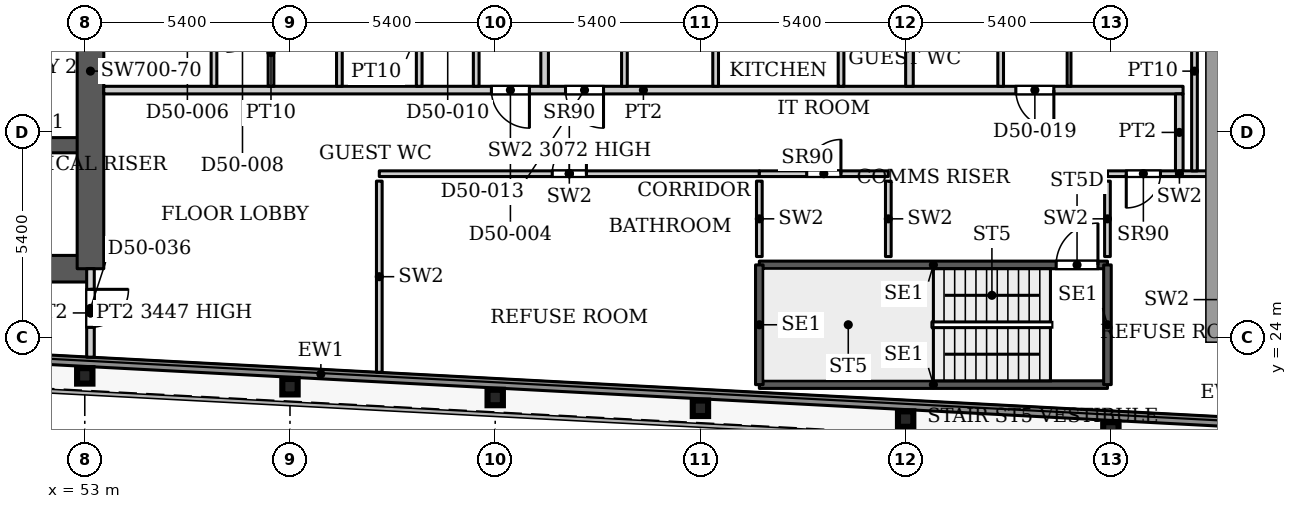
"""IFC4 building model, lengths in metres.
Left out: names, types, materials, properties, quantities, classifications, styles, units other than length and angle.
Written with IfcOpenShell. Run it as: python <this file> out.ifc"""

import sys

from ifc_helpers import new_model, si_unit, direction, frame, frame_2d, origin, origin_2d, place, context, subcontext, project, spatial, rectangle, i_section, extrude, source, transform, mapped, element, fill, save


model = new_model("IFC4")
c1 = context("Model", 3, precision=1e-05, world=origin(), true_north=direction((0.0, 1.0)))
c2 = subcontext(c1, "Body", "Model", "MODEL_VIEW")
j1 = project(units=[si_unit("LENGTHUNIT", "METRE"), si_unit("PLANEANGLEUNIT", "RADIAN")], contexts=[c1])
p1 = place(None, origin())
s1 = spatial("IfcSite", under=j1, at=p1, CompositionType="ELEMENT")
p2 = place(p1, origin())
s2 = spatial("IfcBuilding", under=s1, at=p2, CompositionType="ELEMENT")
p3 = place(p2, frame((0.0, 0.0, 220.1)))
s3 = spatial("IfcBuildingStorey", under=s2, at=p3, CompositionType="ELEMENT", Elevation=220.1)
for number, where, z_axis, x_axis in (
    (1, (80.0, 21.558, 0.0), (0.0, 0.0, 1.0), (1.0, 0.0, 0.0)),
    (2, (74.6, 21.843, 0.0), (0.0, 0.0, 1.0), (1.0, 0.0, 0.0)),
    (3, (69.2, 22.127, 0.0), (0.0, 0.0, 1.0), (1.0, 0.0, 0.0)),
    (4, (63.8, 22.411, 0.0), (0.0, 0.0, 1.0), (1.0, 0.0, 0.0)),
    (5, (58.4, 22.695, 0.0), (0.0, 0.0, 1.0), (1.0, 0.0, 0.0)),
    (6, (53.0, 22.98, 0.0), (0.0, 0.0, 1.0), (1.0, 0.0, 0.0)),
):
    element("IfcColumn", number, at=place(p3, frame(where, z_axis=z_axis, x_axis=x_axis)), inside=s3, PredefinedType="COLUMN", context=c2, shape_type="SweptSolid", body=[
        extrude(i_section(OverallWidth=0.404, OverallDepth=0.407, WebThickness=0.027, FlangeThickness=0.044, FilletRadius=0.012, at=origin_2d()), origin(), (0.0, 0.0, 1.0), 3.9),
    ])
p4 = place(p3, frame((34.75, 25.8, 0.0), z_axis=(0.0, 0.0, 1.0), x_axis=(1.0, 0.0, 0.0)))
e7 = element("IfcWall", 7, at=p4, inside=s3, PredefinedType="SHEAR", context=c2, shape_type="SweptSolid", body=[
    extrude(rectangle(XDim=18.4, YDim=0.7, at=frame_2d((9.2, 0.0))), origin(), (0.0, 0.0, 1.0), 3.9),
])
p5 = place(p3, frame((34.75, 29.05, 0.0), z_axis=(0.0, 0.0, 1.0), x_axis=(1.0, 0.0, 0.0)))
e8 = element("IfcWall", 8, at=p5, inside=s3, PredefinedType="SHEAR", context=c2, shape_type="SweptSolid", body=[
    extrude(rectangle(XDim=18.4, YDim=0.4, at=frame_2d((9.2, 0.0))), origin(), (0.0, 0.0, 1.0), 3.9),
])
p6 = place(p5, frame((0.875, 0.0, 0.0)))
e9 = element("IfcOpeningElement", 9, at=p6, cuts=e8, PredefinedType="OPENING", context=c2, shape_type="SweptSolid", body=[
    extrude(rectangle(XDim=1.1, YDim=2.2, at=frame_2d((0.55, 1.1))), frame((0.0, 0.21, 0.0), z_axis=(0.0, -1.0, 0.0), x_axis=(1.0, 0.0, 0.0)), (0.0, 0.0, 1.0), 0.42),
])
p7 = place(p5, frame((3.725, 0.0, 0.0)))
e10 = element("IfcOpeningElement", 10, at=p7, cuts=e8, PredefinedType="OPENING", context=c2, shape_type="SweptSolid", body=[
    extrude(rectangle(XDim=1.1, YDim=2.2, at=frame_2d((0.55, 1.1))), frame((0.0, 0.21, 0.0), z_axis=(0.0, -1.0, 0.0), x_axis=(1.0, 0.0, 0.0)), (0.0, 0.0, 1.0), 0.42),
])
p8 = place(p5, frame((6.575, 0.0, 0.0)))
e11 = element("IfcOpeningElement", 11, at=p8, cuts=e8, PredefinedType="OPENING", context=c2, shape_type="SweptSolid", body=[
    extrude(rectangle(XDim=1.1, YDim=2.2, at=frame_2d((0.55, 1.1))), frame((0.0, 0.21, 0.0), z_axis=(0.0, -1.0, 0.0), x_axis=(1.0, 0.0, 0.0)), (0.0, 0.0, 1.0), 0.42),
])
p9 = place(p5, frame((9.425, 0.0, 0.0)))
e12 = element("IfcOpeningElement", 12, at=p9, cuts=e8, PredefinedType="OPENING", context=c2, shape_type="SweptSolid", body=[
    extrude(rectangle(XDim=1.1, YDim=2.2, at=frame_2d((0.55, 1.1))), frame((0.0, 0.21, 0.0), z_axis=(0.0, -1.0, 0.0), x_axis=(1.0, 0.0, 0.0)), (0.0, 0.0, 1.0), 0.42),
])
p10 = place(p5, frame((12.275, 0.0, 0.0)))
e13 = element("IfcOpeningElement", 13, at=p10, cuts=e8, PredefinedType="OPENING", context=c2, shape_type="SweptSolid", body=[
    extrude(rectangle(XDim=1.1, YDim=2.2, at=frame_2d((0.55, 1.1))), frame((0.0, 0.21, 0.0), z_axis=(0.0, -1.0, 0.0), x_axis=(1.0, 0.0, 0.0)), (0.0, 0.0, 1.0), 0.42),
])
p11 = place(p5, frame((15.125, 0.0, 0.0)))
e14 = element("IfcOpeningElement", 14, at=p11, cuts=e8, PredefinedType="OPENING", context=c2, shape_type="SweptSolid", body=[
    extrude(rectangle(XDim=1.1, YDim=2.2, at=frame_2d((0.55, 1.1))), frame((0.0, 0.21, 0.0), z_axis=(0.0, -1.0, 0.0), x_axis=(1.0, 0.0, 0.0)), (0.0, 0.0, 1.0), 0.42),
])
p12 = place(p3, frame((53.15, 25.8, 0.0), z_axis=(0.0, 0.0, 1.0), x_axis=(0.0, 1.0, 0.0)))
e15 = element("IfcWall", 15, at=p12, inside=s3, PredefinedType="SHEAR", context=c2, shape_type="SweptSolid", body=[
    extrude(rectangle(XDim=10.4, YDim=0.7, at=frame_2d((5.2, 0.0))), origin(), (0.0, 0.0, 1.0), 3.9),
])
p13 = place(p3, frame((84.386, 21.703, 0.0), z_axis=(0.0, 0.0, 1.0), x_axis=(-0.998617508267, 0.05256493302, 0.0)))
e16 = element("IfcWall", 16, at=p13, inside=s3, PredefinedType="SOLIDWALL", context=c2, shape_type="SweptSolid", body=[
    extrude(rectangle(XDim=50.417, YDim=0.25, at=frame_2d((25.208, 0.0))), origin(), (0.0, 0.0, 1.0), 3.75),
])
p14 = place(p3, frame((70.75, 22.75, 0.0), z_axis=(0.0, 0.0, 1.0), x_axis=(1.0, 0.0, 0.0)))
e17 = element("IfcWall", 17, at=p14, inside=s3, PredefinedType="SHEAR", context=c2, shape_type="SweptSolid", body=[
    extrude(rectangle(XDim=9.16, YDim=0.2, at=frame_2d((4.58, 0.0))), origin(), (0.0, 0.0, 1.0), 3.9),
])
p15 = place(p3, frame((70.75, 25.9, 0.0), z_axis=(0.0, 0.0, 1.0), x_axis=(1.0, 0.0, 0.0)))
e18 = element("IfcWall", 18, at=p15, inside=s3, PredefinedType="SHEAR", context=c2, shape_type="SweptSolid", body=[
    extrude(rectangle(XDim=9.16, YDim=0.2, at=frame_2d((4.58, 0.0))), origin(), (0.0, 0.0, 1.0), 3.9),
])
p16 = place(p15, frame((7.81, 0.0, 0.0)))
e19 = element("IfcOpeningElement", 19, at=p16, cuts=e18, PredefinedType="OPENING", context=c2, shape_type="SweptSolid", body=[
    extrude(rectangle(XDim=1.1, YDim=2.2, at=frame_2d((0.55, 1.1))), frame((0.0, 0.11, 0.0), z_axis=(0.0, -1.0, 0.0), x_axis=(1.0, 0.0, 0.0)), (0.0, 0.0, 1.0), 0.22),
])
for number, where, z_axis, x_axis in (
    (20, (70.75, 22.75, 0.0), (0.0, 0.0, 1.0), (0.0, 1.0, 0.0)),
    (21, (79.91, 22.75, 0.0), (0.0, 0.0, 1.0), (0.0, 1.0, 0.0)),
):
    element("IfcWall", number, at=place(p3, frame(where, z_axis=z_axis, x_axis=x_axis)), inside=s3, PredefinedType="SHEAR", context=c2, shape_type="SweptSolid", body=[
        extrude(rectangle(XDim=3.15, YDim=0.2, at=frame_2d((1.575, 0.0))), origin(), (0.0, 0.0, 1.0), 3.9),
    ])
p17 = place(p3, frame((60.75, 28.3, 0.0), z_axis=(0.0, 0.0, 1.0), x_axis=(1.0, 0.0, 0.0)))
e22 = element("IfcWall", 22, at=p17, inside=s3, PredefinedType="PARTITIONING", context=c2, shape_type="SweptSolid", body=[
    extrude(rectangle(XDim=10.0, YDim=0.15, at=frame_2d((5.0, 0.0))), origin(), (0.0, 0.0, 1.0), 3.072),
])
p18 = place(p17, frame((4.55, 0.0, 0.0)))
e23 = element("IfcOpeningElement", 23, at=p18, cuts=e22, PredefinedType="OPENING", context=c2, shape_type="SweptSolid", body=[
    extrude(rectangle(XDim=0.9, YDim=2.2, at=frame_2d((0.45, 1.1))), frame((0.0, 0.085, 0.0), z_axis=(0.0, -1.0, 0.0), x_axis=(1.0, 0.0, 0.0)), (0.0, 0.0, 1.0), 0.17),
])
p19 = place(p3, frame((60.75, 23.075, 0.0), z_axis=(0.0, 0.0, 1.0), x_axis=(0.0, 1.0, 0.0)))
e24 = element("IfcWall", 24, at=p19, inside=s3, PredefinedType="PARTITIONING", context=c2, shape_type="SweptSolid", body=[
    extrude(rectangle(XDim=5.03, YDim=0.15, at=frame_2d((2.515, 0.0))), origin(), (0.0, 0.0, 1.0), 3.9),
])
p20 = place(p3, frame((70.75, 26.12, 0.0), z_axis=(0.0, 0.0, 1.0), x_axis=(0.0, 1.0, 0.0)))
e25 = element("IfcWall", 25, at=p20, inside=s3, PredefinedType="PARTITIONING", context=c2, shape_type="SweptSolid", body=[
    extrude(rectangle(XDim=1.985, YDim=0.15, at=frame_2d((0.992, 0.0))), origin(), (0.0, 0.0, 1.0), 3.9),
])
p21 = place(p3, frame((70.75, 28.3, 0.0), z_axis=(0.0, 0.0, 1.0), x_axis=(1.0, 0.0, 0.0)))
e26 = element("IfcWall", 26, at=p21, inside=s3, PredefinedType="PARTITIONING", context=c2, shape_type="SweptSolid", body=[
    extrude(rectangle(XDim=3.394, YDim=0.15, at=frame_2d((1.697, 0.0))), origin(), (0.0, 0.0, 1.0), 3.9),
])
p22 = place(p21, frame((1.247, 0.0, 0.0)))
e27 = element("IfcOpeningElement", 27, at=p22, cuts=e26, PredefinedType="OPENING", context=c2, shape_type="SweptSolid", body=[
    extrude(rectangle(XDim=0.9, YDim=2.2, at=frame_2d((0.45, 1.1))), frame((0.0, 0.085, 0.0), z_axis=(0.0, -1.0, 0.0), x_axis=(1.0, 0.0, 0.0)), (0.0, 0.0, 1.0), 0.17),
])
p23 = place(p3, frame((74.144, 26.12, 0.0), z_axis=(0.0, 0.0, 1.0), x_axis=(0.0, 1.0, 0.0)))
e28 = element("IfcWall", 28, at=p23, inside=s3, PredefinedType="PARTITIONING", context=c2, shape_type="SweptSolid", body=[
    extrude(rectangle(XDim=1.985, YDim=0.15, at=frame_2d((0.992, 0.0))), origin(), (0.0, 0.0, 1.0), 3.9),
])
p24 = place(p3, frame((79.91, 28.3, 0.0), z_axis=(0.0, 0.0, 1.0), x_axis=(1.0, 0.0, 0.0)))
e29 = element("IfcWall", 29, at=p24, inside=s3, PredefinedType="PARTITIONING", context=c2, shape_type="SweptSolid", body=[
    extrude(rectangle(XDim=3.788, YDim=0.15, at=frame_2d((1.894, 0.0))), origin(), (0.0, 0.0, 1.0), 3.9),
])
p25 = place(p24, frame((0.495, 0.0, 0.0)))
e30 = element("IfcOpeningElement", 30, at=p25, cuts=e29, PredefinedType="OPENING", context=c2, shape_type="SweptSolid", body=[
    extrude(rectangle(XDim=0.9, YDim=2.2, at=frame_2d((0.45, 1.1))), frame((0.0, 0.085, 0.0), z_axis=(0.0, -1.0, 0.0), x_axis=(1.0, 0.0, 0.0)), (0.0, 0.0, 1.0), 0.17),
])
p26 = place(p3, frame((79.91, 26.12, 0.0), z_axis=(0.0, 0.0, 1.0), x_axis=(0.0, 1.0, 0.0)))
e31 = element("IfcWall", 31, at=p26, inside=s3, PredefinedType="PARTITIONING", context=c2, shape_type="SweptSolid", body=[
    extrude(rectangle(XDim=1.985, YDim=0.15, at=frame_2d((0.992, 0.0))), origin(), (0.0, 0.0, 1.0), 3.9),
])
p27 = place(p3, frame((53.15, 23.472, 0.0), z_axis=(0.0, 0.0, 1.0), x_axis=(0.0, 1.0, 0.0)))
e32 = element("IfcWall", 32, at=p27, inside=s3, PredefinedType="PARTITIONING", context=c2, shape_type="SweptSolid", body=[
    extrude(rectangle(XDim=2.328, YDim=0.2, at=frame_2d((1.164, 0.0))), origin(), (0.0, 0.0, 1.0), 3.447),
])
p28 = place(p27, frame((0.785, 0.0, 0.0)))
e33 = element("IfcOpeningElement", 33, at=p28, cuts=e32, PredefinedType="OPENING", context=c2, shape_type="SweptSolid", body=[
    extrude(rectangle(XDim=1.0, YDim=2.1, at=frame_2d((0.5, 1.05))), frame((0.0, 0.11, 0.0), z_axis=(0.0, -1.0, 0.0), x_axis=(1.0, 0.0, 0.0)), (0.0, 0.0, 1.0), 0.22),
])
p29 = place(p3, frame((53.499, 30.5, 0.0), z_axis=(0.0, 0.0, 1.0), x_axis=(1.0, 0.0, 0.0)))
e34 = element("IfcWall", 34, at=p29, inside=s3, PredefinedType="PARTITIONING", context=c2, shape_type="SweptSolid", body=[
    extrude(rectangle(XDim=28.401, YDim=0.2, at=frame_2d((14.2, 0.0))), origin(), (0.0, 0.0, 1.0), 3.6),
])
p30 = place(p29, frame((10.201, 0.0, 0.0)))
e35 = element("IfcOpeningElement", 35, at=p30, cuts=e34, PredefinedType="OPENING", context=c2, shape_type="SweptSolid", body=[
    extrude(rectangle(XDim=1.0, YDim=2.1, at=frame_2d((0.5, 1.05))), frame((0.0, 0.11, 0.0), z_axis=(0.0, -1.0, 0.0), x_axis=(1.0, 0.0, 0.0)), (0.0, 0.0, 1.0), 0.22),
])
p31 = place(p29, frame((12.151, 0.0, 0.0)))
e36 = element("IfcOpeningElement", 36, at=p31, cuts=e34, PredefinedType="OPENING", context=c2, shape_type="SweptSolid", body=[
    extrude(rectangle(XDim=1.0, YDim=2.1, at=frame_2d((0.5, 1.05))), frame((0.0, 0.11, 0.0), z_axis=(0.0, -1.0, 0.0), x_axis=(1.0, 0.0, 0.0)), (0.0, 0.0, 1.0), 0.22),
])
p32 = place(p29, frame((24.001, 0.0, 0.0)))
e37 = element("IfcOpeningElement", 37, at=p32, cuts=e34, PredefinedType="OPENING", context=c2, shape_type="SweptSolid", body=[
    extrude(rectangle(XDim=1.0, YDim=2.1, at=frame_2d((0.5, 1.05))), frame((0.0, 0.11, 0.0), z_axis=(0.0, -1.0, 0.0), x_axis=(1.0, 0.0, 0.0)), (0.0, 0.0, 1.0), 0.22),
])
p33 = place(p3, frame((56.4, 30.6, 0.0), z_axis=(0.0, 0.0, 1.0), x_axis=(0.0, 1.0, 0.0)))
e38 = element("IfcWall", 38, at=p33, inside=s3, PredefinedType="PARTITIONING", context=c2, shape_type="SweptSolid", body=[
    extrude(rectangle(XDim=3.025, YDim=0.15, at=frame_2d((1.512, 0.0))), origin(), (0.0, 0.0, 1.0), 3.6),
])
p34 = place(p3, frame((57.9, 30.6, 0.0), z_axis=(0.0, 0.0, 1.0), x_axis=(0.0, 1.0, 0.0)))
e39 = element("IfcWall", 39, at=p34, inside=s3, PredefinedType="PARTITIONING", context=c2, shape_type="SweptSolid", body=[
    extrude(rectangle(XDim=1.775, YDim=0.15, at=frame_2d((0.887, 0.0))), origin(), (0.0, 0.0, 1.0), 3.6),
])
for number, where, z_axis, x_axis in (
    (40, (59.7, 30.6, 0.0), (0.0, 0.0, 1.0), (0.0, 1.0, 0.0)),
    (41, (61.8, 30.6, 0.0), (0.0, 0.0, 1.0), (0.0, 1.0, 0.0)),
    (42, (63.3, 30.6, 0.0), (0.0, 0.0, 1.0), (0.0, 1.0, 0.0)),
):
    element("IfcWall", number, at=place(p3, frame(where, z_axis=z_axis, x_axis=x_axis)), inside=s3, PredefinedType="PARTITIONING", context=c2, shape_type="SweptSolid", body=[
        extrude(rectangle(XDim=3.025, YDim=0.15, at=frame_2d((1.512, 0.0))), origin(), (0.0, 0.0, 1.0), 3.6),
    ])
p35 = place(p3, frame((65.1, 30.6, 0.0), z_axis=(0.0, 0.0, 1.0), x_axis=(0.0, 1.0, 0.0)))
e43 = element("IfcWall", 43, at=p35, inside=s3, PredefinedType="PARTITIONING", context=c2, shape_type="SweptSolid", body=[
    extrude(rectangle(XDim=13.3, YDim=0.2, at=frame_2d((6.65, 0.0))), origin(), (0.0, 0.0, 1.0), 3.6),
])
for number, where, z_axis, x_axis in (
    (44, (67.2, 30.6, 0.0), (0.0, 0.0, 1.0), (0.0, 1.0, 0.0)),
    (45, (69.6, 30.6, 0.0), (0.0, 0.0, 1.0), (0.0, 1.0, 0.0)),
    (46, (72.9, 30.6, 0.0), (0.0, 0.0, 1.0), (0.0, 1.0, 0.0)),
):
    element("IfcWall", number, at=place(p3, frame(where, z_axis=z_axis, x_axis=x_axis)), inside=s3, PredefinedType="PARTITIONING", context=c2, shape_type="SweptSolid", body=[
        extrude(rectangle(XDim=3.025, YDim=0.15, at=frame_2d((1.512, 0.0))), origin(), (0.0, 0.0, 1.0), 3.6),
    ])
p36 = place(p3, frame((74.7, 30.6, 0.0), z_axis=(0.0, 0.0, 1.0), x_axis=(0.0, 1.0, 0.0)))
e47 = element("IfcWall", 47, at=p36, inside=s3, PredefinedType="PARTITIONING", context=c2, shape_type="SweptSolid", body=[
    extrude(rectangle(XDim=13.3, YDim=0.2, at=frame_2d((6.65, 0.0))), origin(), (0.0, 0.0, 1.0), 3.6),
])
p37 = place(p3, frame((77.1, 30.6, 0.0), z_axis=(0.0, 0.0, 1.0), x_axis=(0.0, 1.0, 0.0)))
e48 = element("IfcWall", 48, at=p37, inside=s3, PredefinedType="PARTITIONING", context=c2, shape_type="SweptSolid", body=[
    extrude(rectangle(XDim=3.175, YDim=0.15, at=frame_2d((1.587, 0.0))), origin(), (0.0, 0.0, 1.0), 3.6),
])
p38 = place(p3, frame((78.9, 30.6, 0.0), z_axis=(0.0, 0.0, 1.0), x_axis=(0.0, 1.0, 0.0)))
e49 = element("IfcWall", 49, at=p38, inside=s3, PredefinedType="PARTITIONING", context=c2, shape_type="SweptSolid", body=[
    extrude(rectangle(XDim=3.025, YDim=0.1, at=frame_2d((1.512, 0.0))), origin(), (0.0, 0.0, 1.0), 3.6),
])
p39 = place(p3, frame((81.8, 28.374, 0.0), z_axis=(0.0, 0.0, 1.0), x_axis=(0.0, 1.0, 0.0)))
e50 = element("IfcWall", 50, at=p39, inside=s3, PredefinedType="PARTITIONING", context=c2, shape_type="SweptSolid", body=[
    extrude(rectangle(XDim=2.026, YDim=0.2, at=frame_2d((1.013, 0.0))), origin(), (0.0, 0.0, 1.0), 3.6),
])
p40 = place(p3, frame((82.2, 28.374, 0.0), z_axis=(0.0, 0.0, 1.0), x_axis=(0.0, 1.0, 0.0)))
e51 = element("IfcWall", 51, at=p40, inside=s3, PredefinedType="PARTITIONING", context=c2, shape_type="SweptSolid", body=[
    extrude(rectangle(XDim=5.251, YDim=0.15, at=frame_2d((2.625, 0.0))), origin(), (0.0, 0.0, 1.0), 3.6),
])
m1 = source(origin(), c2, "Body", "SweptSolid", [
    extrude(rectangle(XDim=0.9, YDim=2.2, at=frame_2d((0.45, 1.1))), frame((0.0, 0.025, 0.0), z_axis=(0.0, -1.0, 0.0), x_axis=(1.0, 0.0, 0.0)), (0.0, 0.0, 1.0), 0.05),
])
p41 = place(p18, origin())
e52 = element("IfcDoor", 52, at=p41, inside=s3, OperationType="SINGLE_SWING_LEFT", PredefinedType="DOOR", context=c2, shape_type="MappedRepresentation", body=[
    mapped(m1, transform((0.0, 0.0, 0.0), x_axis=(1.0, 0.0, 0.0), y_axis=(0.0, 1.0, 0.0), z_axis=(0.0, 0.0, 1.0), scale=1.0)),
])
fill(e23, e52)
p42 = place(p22, origin())
e53 = element("IfcDoor", 53, at=p42, inside=s3, OperationType="SINGLE_SWING_LEFT", PredefinedType="DOOR", context=c2, shape_type="MappedRepresentation", body=[
    mapped(m1, transform((0.0, 0.0, 0.0), x_axis=(1.0, 0.0, 0.0), y_axis=(0.0, 1.0, 0.0), z_axis=(0.0, 0.0, 1.0), scale=1.0)),
])
fill(e27, e53)
p43 = place(p25, origin())
e54 = element("IfcDoor", 54, at=p43, inside=s3, OperationType="SINGLE_SWING_RIGHT", PredefinedType="DOOR", context=c2, shape_type="MappedRepresentation", body=[
    mapped(m1, transform((0.0, 0.0, 0.0), x_axis=(1.0, 0.0, 0.0), y_axis=(0.0, 1.0, 0.0), z_axis=(0.0, 0.0, 1.0), scale=1.0)),
])
fill(e30, e54)
m2 = source(origin(), c2, "Body", "SweptSolid", [
    extrude(rectangle(XDim=1.1, YDim=2.2, at=frame_2d((0.55, 1.1))), frame((0.0, 0.025, 0.0), z_axis=(0.0, -1.0, 0.0), x_axis=(1.0, 0.0, 0.0)), (0.0, 0.0, 1.0), 0.05),
])
p44 = place(p16, origin())
e55 = element("IfcDoor", 55, at=p44, inside=s3, OperationType="SINGLE_SWING_LEFT", PredefinedType="DOOR", context=c2, shape_type="MappedRepresentation", body=[
    mapped(m2, transform((0.0, 0.0, 0.0), x_axis=(1.0, 0.0, 0.0), y_axis=(0.0, 1.0, 0.0), z_axis=(0.0, 0.0, 1.0), scale=1.0)),
])
fill(e19, e55)
m3 = source(origin(), c2, "Body", "SweptSolid", [
    extrude(rectangle(XDim=1.0, YDim=2.1, at=frame_2d((0.5, 1.05))), frame((0.0, 0.025, 0.0), z_axis=(0.0, -1.0, 0.0), x_axis=(1.0, 0.0, 0.0)), (0.0, 0.0, 1.0), 0.05),
])
p45 = place(p30, origin())
e56 = element("IfcDoor", 56, at=p45, inside=s3, OperationType="SINGLE_SWING_RIGHT", PredefinedType="DOOR", context=c2, shape_type="MappedRepresentation", body=[
    mapped(m3, transform((0.0, 0.0, 0.0), x_axis=(1.0, 0.0, 0.0), y_axis=(0.0, 1.0, 0.0), z_axis=(0.0, 0.0, 1.0), scale=1.0)),
])
fill(e35, e56)
p46 = place(p31, origin())
e57 = element("IfcDoor", 57, at=p46, inside=s3, OperationType="SINGLE_SWING_RIGHT", PredefinedType="DOOR", context=c2, shape_type="MappedRepresentation", body=[
    mapped(m3, transform((0.0, 0.0, 0.0), x_axis=(1.0, 0.0, 0.0), y_axis=(0.0, 1.0, 0.0), z_axis=(0.0, 0.0, 1.0), scale=1.0)),
])
fill(e36, e57)
p47 = place(p32, origin())
e58 = element("IfcDoor", 58, at=p47, inside=s3, OperationType="SINGLE_SWING_RIGHT", PredefinedType="DOOR", context=c2, shape_type="MappedRepresentation", body=[
    mapped(m3, transform((0.0, 0.0, 0.0), x_axis=(1.0, 0.0, 0.0), y_axis=(0.0, 1.0, 0.0), z_axis=(0.0, 0.0, 1.0), scale=1.0)),
])
fill(e37, e58)
m4 = source(origin(), c2, "Body", "SweptSolid", [
    extrude(rectangle(XDim=1.0, YDim=2.1, at=frame_2d((0.5, 1.05))), frame((0.0, 0.025, 0.0), z_axis=(0.0, -1.0, 0.0), x_axis=(1.0, 0.0, 0.0)), (0.0, 0.0, 1.0), 0.05),
])
p48 = place(p28, origin())
e59 = element("IfcDoor", 59, at=p48, inside=s3, OperationType="SINGLE_SWING_RIGHT", PredefinedType="DOOR", context=c2, shape_type="MappedRepresentation", body=[
    mapped(m4, transform((0.0, 0.0, 0.0), x_axis=(1.0, 0.0, 0.0), y_axis=(0.0, 1.0, 0.0), z_axis=(0.0, 0.0, 1.0), scale=1.0)),
])
fill(e33, e59)
save(model, sys.argv[1])
